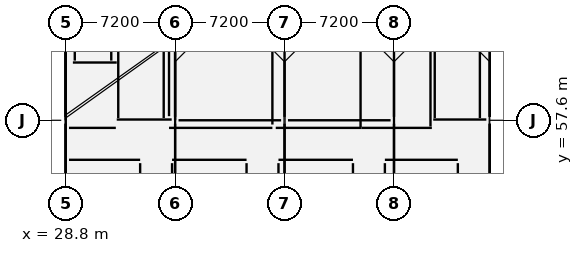
"""IFC4 building model, lengths in metres.
Left out: names, types, materials, properties, quantities, classifications, styles, units other than length and angle.
Written with IfcOpenShell. Run it as: python <this file> out.ifc"""

import sys

from ifc_helpers import new_model, si_unit, direction, frame, frame_2d, origin, origin_2d, place, context, subcontext, project, spatial, rectangle, hollow_rectangle, extrude, element, fill, save


model = new_model("IFC4")
c1 = context("Model", 3, precision=1e-05, world=origin(), true_north=direction((0.0, 1.0)))
c2 = subcontext(c1, "Body", "Model", "MODEL_VIEW")
j1 = project(units=[si_unit("LENGTHUNIT", "METRE"), si_unit("PLANEANGLEUNIT", "RADIAN")], contexts=[c1])
p1 = place(None, origin())
s1 = spatial("IfcSite", under=j1, at=p1, CompositionType="ELEMENT")
p2 = place(p1, origin())
s2 = spatial("IfcBuilding", under=s1, at=p2, CompositionType="ELEMENT")
p3 = place(p2, frame((0.0, 0.0, 9.6)))
s3 = spatial("IfcBuildingStorey", under=s2, at=p3, CompositionType="ELEMENT", Elevation=9.6)
for number, where, z_axis, x_axis in (
    (1, (28.8, 57.6, 0.0), (0.0, 0.0, 1.0), (1.0, 0.0, 0.0)),
    (2, (36.0, 57.6, 0.0), (0.0, 0.0, 1.0), (1.0, 0.0, 0.0)),
    (3, (43.2, 57.6, 0.0), (0.0, 0.0, 1.0), (1.0, 0.0, 0.0)),
    (4, (50.4, 57.6, 0.0), (0.0, 0.0, 1.0), (1.0, 0.0, 0.0)),
    (5, (56.7, 57.6, 0.0), (0.0, 0.0, 1.0), (1.0, 0.0, 0.0)),
):
    element("IfcColumn", number, at=place(p3, frame(where, z_axis=z_axis, x_axis=x_axis)), inside=s3, PredefinedType="COLUMN", context=c2, shape_type="SweptSolid", body=[
        extrude(rectangle(XDim=0.45, YDim=0.45, at=origin_2d()), origin(), (0.0, 0.0, 1.0), 3.9),
    ])
p4 = place(p3, frame((29.275, 61.4, 0.0), z_axis=(0.0, 0.0, 1.0), x_axis=(1.0, 0.0, 0.0)))
e6 = element("IfcWall", 6, at=p4, inside=s3, PredefinedType="SHEAR", context=c2, shape_type="SweptSolid", body=[
    extrude(rectangle(XDim=2.885, YDim=0.25, at=frame_2d((1.442, 0.0))), origin(), (0.0, 0.0, 1.0), 3.65),
])
p5 = place(p4, frame((0.942, 0.0, 0.0)))
e7 = element("IfcOpeningElement", 7, at=p5, cuts=e6, PredefinedType="OPENING", context=c2, shape_type="SweptSolid", body=[
    extrude(rectangle(XDim=1.0, YDim=2.1, at=frame_2d((0.5, 1.05))), frame((0.0, 0.137, 0.0), z_axis=(0.0, -1.0, 0.0), x_axis=(1.0, 0.0, 0.0)), (0.0, 0.0, 1.0), 0.274),
])
for number, where, z_axis, x_axis in (
    (8, (29.4, 61.525, 0.0), (0.0, 0.0, 1.0), (0.0, 1.0, 0.0)),
    (9, (31.8, 61.525, 0.0), (0.0, 0.0, 1.0), (0.0, 1.0, 0.0)),
):
    element("IfcWall", number, at=place(p3, frame(where, z_axis=z_axis, x_axis=x_axis)), inside=s3, PredefinedType="SHEAR", context=c2, shape_type="SweptSolid", body=[
        extrude(rectangle(XDim=2.15, YDim=0.25, at=frame_2d((1.075, 0.0))), origin(), (0.0, 0.0, 1.0), 3.65),
    ])
p6 = place(p3, frame((32.16, 57.65, 0.0), z_axis=(0.0, 0.0, 1.0), x_axis=(1.0, 0.0, 0.0)))
e10 = element("IfcWall", 10, at=p6, inside=s3, PredefinedType="SHEAR", context=c2, shape_type="SweptSolid", body=[
    extrude(rectangle(XDim=3.615, YDim=0.2, at=frame_2d((1.808, 0.0))), origin(), (0.0, 0.0, 1.0), 3.65),
])
p7 = place(p6, frame((1.258, 0.0, 0.0)))
e11 = element("IfcOpeningElement", 11, at=p7, cuts=e10, PredefinedType="OPENING", context=c2, shape_type="SweptSolid", body=[
    extrude(rectangle(XDim=1.1, YDim=2.15, at=frame_2d((0.55, 1.075))), frame((0.0, 0.112, 0.0), z_axis=(0.0, -1.0, 0.0), x_axis=(1.0, 0.0, 0.0)), (0.0, 0.0, 1.0), 0.224),
])
for number, where, z_axis, x_axis in (
    (12, (32.26, 57.75, 0.0), (0.0, 0.0, 1.0), (0.0, 1.0, 0.0)),
    (13, (35.25, 57.75, 0.0), (0.0, 0.0, 1.0), (0.0, 1.0, 0.0)),
):
    element("IfcWall", number, at=place(p3, frame(where, z_axis=z_axis, x_axis=x_axis)), inside=s3, PredefinedType="SHEAR", context=c2, shape_type="SweptSolid", body=[
        extrude(rectangle(XDim=6.56, YDim=0.2, at=frame_2d((3.28, 0.0))), origin(), (0.0, 0.0, 1.0), 3.65),
    ])
p8 = place(p3, frame((52.98, 57.65, 0.0), z_axis=(0.0, 0.0, 1.0), x_axis=(1.0, 0.0, 0.0)))
e14 = element("IfcWall", 14, at=p8, inside=s3, PredefinedType="SHEAR", context=c2, shape_type="SweptSolid", body=[
    extrude(rectangle(XDim=3.495, YDim=0.2, at=frame_2d((1.748, 0.0))), origin(), (0.0, 0.0, 1.0), 3.65),
])
p9 = place(p8, frame((1.198, 0.0, 0.0)))
e15 = element("IfcOpeningElement", 15, at=p9, cuts=e14, PredefinedType="OPENING", context=c2, shape_type="SweptSolid", body=[
    extrude(rectangle(XDim=1.1, YDim=2.15, at=frame_2d((0.55, 1.075))), frame((0.0, 0.112, 0.0), z_axis=(0.0, -1.0, 0.0), x_axis=(1.0, 0.0, 0.0)), (0.0, 0.0, 1.0), 0.224),
])
for number, where, z_axis, x_axis in (
    (16, (53.08, 57.75, 0.0), (0.0, 0.0, 1.0), (0.0, 1.0, 0.0)),
    (17, (56.05, 57.75, 0.0), (0.0, 0.0, 1.0), (0.0, 1.0, 0.0)),
):
    element("IfcWall", number, at=place(p3, frame(where, z_axis=z_axis, x_axis=x_axis)), inside=s3, PredefinedType="SHEAR", context=c2, shape_type="SweptSolid", body=[
        extrude(rectangle(XDim=6.54, YDim=0.2, at=frame_2d((3.27, 0.0))), origin(), (0.0, 0.0, 1.0), 3.65),
    ])
p10 = place(p3, frame((28.8, 57.6, 3.9), z_axis=(0.0, 0.0, 1.0), x_axis=(1.0, 0.0, 0.0)))
e18 = element("IfcColumn", 18, at=p10, inside=s3, PredefinedType="COLUMN", context=c2, shape_type="SweptSolid", body=[
    extrude(hollow_rectangle(XDim=0.25, YDim=0.25, WallThickness=0.012, InnerFilletRadius=0.012, OuterFilletRadius=0.024, at=origin_2d()), origin(), (0.0, 0.0, 1.0), 2.29),
])
p11 = place(p3, frame((36.0, 57.6, 3.9), z_axis=(0.0, 0.0, 1.0), x_axis=(1.0, 0.0, 0.0)))
e19 = element("IfcColumn", 19, at=p11, inside=s3, PredefinedType="COLUMN", context=c2, shape_type="SweptSolid", body=[
    extrude(hollow_rectangle(XDim=0.25, YDim=0.25, WallThickness=0.012, InnerFilletRadius=0.012, OuterFilletRadius=0.024, at=origin_2d()), origin(), (0.0, 0.0, 1.0), 4.18),
])
for number, where, z_axis, x_axis in (
    (20, (56.7, 50.625, 0.0), (0.0, 0.0, 1.0), (0.0, 1.0, 0.0)),
    (21, (56.7, 57.825, 0.0), (0.0, 0.0, 1.0), (0.0, 1.0, 0.0)),
    (22, (28.8, 64.575, 0.0), (0.0, 0.0, 1.0), (0.0, -1.0, 0.0)),
):
    element("IfcWall", number, at=place(p3, frame(where, z_axis=z_axis, x_axis=x_axis)), inside=s3, PredefinedType="ELEMENTEDWALL", context=c2, shape_type="SweptSolid", body=[
        extrude(rectangle(XDim=6.75, YDim=0.28, at=frame_2d((3.375, 0.0))), origin(), (0.0, 0.0, 1.0), 3.473),
    ])
p12 = place(p3, frame((28.8, 57.375, 0.0), z_axis=(0.0, 0.0, 1.0), x_axis=(0.0, -1.0, 0.0)))
e23 = element("IfcWall", 23, at=p12, inside=s3, PredefinedType="ELEMENTEDWALL", context=c2, shape_type="SweptSolid", body=[
    extrude(rectangle(XDim=6.75, YDim=0.28, at=frame_2d((3.375, 0.0))), origin(), (0.0, 0.0, 1.0), 3.473),
])
p13 = place(p12, frame((3.913, 0.0, 0.85)))
e24 = element("IfcOpeningElement", 24, at=p13, cuts=e23, PredefinedType="OPENING", context=c2, shape_type="SweptSolid", body=[
    extrude(rectangle(XDim=1.4, YDim=1.65, at=frame_2d((0.7, 0.825))), frame((0.0, 0.152, 0.0), z_axis=(0.0, -1.0, 0.0), x_axis=(1.0, 0.0, 0.0)), (0.0, 0.0, 1.0), 0.304),
])
p14 = place(p3, frame((28.8, 50.75, 3.95), z_axis=(0.0, 0.0, 1.0), x_axis=(0.0, 1.0, 0.0)))
e25 = element("IfcWall", 25, at=p14, inside=s3, PredefinedType="ELEMENTEDWALL", context=c2, shape_type="SweptSolid", body=[
    extrude(rectangle(XDim=13.7, YDim=0.28, at=frame_2d((6.85, 0.0))), origin(), (0.0, 0.0, 1.0), 2.23),
])
p15 = place(p3, frame((29.02, 57.1, 0.0), z_axis=(0.0, 0.0, 1.0), x_axis=(1.0, 0.0, 0.0)))
e26 = element("IfcWall", 26, at=p15, inside=s3, PredefinedType="STANDARD", context=c2, shape_type="SweptSolid", body=[
    extrude(rectangle(XDim=3.08, YDim=0.22, at=frame_2d((1.54, 0.0))), origin(), (0.0, 0.0, 1.0), 3.62),
])
p16 = place(p15, frame((0.94, 0.0, 0.0)))
e27 = element("IfcOpeningElement", 27, at=p16, cuts=e26, PredefinedType="OPENING", context=c2, shape_type="SweptSolid", body=[
    extrude(rectangle(XDim=1.2, YDim=2.2, at=frame_2d((0.6, 1.1))), frame((0.0, 0.122, 0.0), z_axis=(0.0, -1.0, 0.0), x_axis=(1.0, 0.0, 0.0)), (0.0, 0.0, 1.0), 0.244),
])
p17 = place(p3, frame((29.02, 55.0, 0.0), z_axis=(0.0, 0.0, 1.0), x_axis=(1.0, 0.0, 0.0)))
e28 = element("IfcWall", 28, at=p17, inside=s3, PredefinedType="PARTITIONING", context=c2, shape_type="SweptSolid", body=[
    extrude(rectangle(XDim=4.68, YDim=0.14, at=frame_2d((2.34, 0.0))), origin(), (0.0, 0.0, 1.0), 3.62),
])
p18 = place(p17, frame((1.865, 0.0, 0.0)))
e29 = element("IfcOpeningElement", 29, at=p18, cuts=e28, PredefinedType="OPENING", context=c2, shape_type="SweptSolid", body=[
    extrude(rectangle(XDim=0.95, YDim=2.1, at=frame_2d((0.475, 1.05))), frame((0.0, 0.082, 0.0), z_axis=(0.0, -1.0, 0.0), x_axis=(1.0, 0.0, 0.0)), (0.0, 0.0, 1.0), 0.164),
])
p19 = place(p3, frame((33.7, 50.62, 0.0), z_axis=(0.0, 0.0, 1.0), x_axis=(0.0, 1.0, 0.0)))
e30 = element("IfcWall", 30, at=p19, inside=s3, PredefinedType="PARTITIONING", context=c2, shape_type="SweptSolid", body=[
    extrude(rectangle(XDim=4.16, YDim=0.14, at=frame_2d((2.08, 0.0))), origin(), (0.0, 0.0, 1.0), 3.62),
])
p20 = place(p19, frame((1.64, 0.0, 0.0)))
e31 = element("IfcOpeningElement", 31, at=p20, cuts=e30, PredefinedType="OPENING", context=c2, shape_type="SweptSolid", body=[
    extrude(rectangle(XDim=0.88, YDim=2.08, at=frame_2d((0.44, 1.04))), frame((0.0, 0.082, 0.0), z_axis=(0.0, -1.0, 0.0), x_axis=(1.0, 0.0, 0.0)), (0.0, 0.0, 1.0), 0.164),
])
p21 = place(p3, frame((35.8, 55.0, 0.0), z_axis=(0.0, 0.0, 1.0), x_axis=(1.0, 0.0, 0.0)))
e32 = element("IfcWall", 32, at=p21, inside=s3, PredefinedType="PARTITIONING", context=c2, shape_type="SweptSolid", body=[
    extrude(rectangle(XDim=4.9, YDim=0.14, at=frame_2d((2.45, 0.0))), origin(), (0.0, 0.0, 1.0), 3.471),
])
p22 = place(p21, frame((1.975, 0.0, 0.0)))
e33 = element("IfcOpeningElement", 33, at=p22, cuts=e32, PredefinedType="OPENING", context=c2, shape_type="SweptSolid", body=[
    extrude(rectangle(XDim=0.95, YDim=2.1, at=frame_2d((0.475, 1.05))), frame((0.0, 0.082, 0.0), z_axis=(0.0, -1.0, 0.0), x_axis=(1.0, 0.0, 0.0)), (0.0, 0.0, 1.0), 0.164),
])
p23 = place(p3, frame((40.7, 50.62, 0.0), z_axis=(0.0, 0.0, 1.0), x_axis=(0.0, 1.0, 0.0)))
e34 = element("IfcWall", 34, at=p23, inside=s3, PredefinedType="PARTITIONING", context=c2, shape_type="SweptSolid", body=[
    extrude(rectangle(XDim=4.16, YDim=0.14, at=frame_2d((2.08, 0.0))), origin(), (0.0, 0.0, 1.0), 3.62),
])
p24 = place(p23, frame((1.64, 0.0, 0.0)))
e35 = element("IfcOpeningElement", 35, at=p24, cuts=e34, PredefinedType="OPENING", context=c2, shape_type="SweptSolid", body=[
    extrude(rectangle(XDim=0.88, YDim=2.08, at=frame_2d((0.44, 1.04))), frame((0.0, 0.082, 0.0), z_axis=(0.0, -1.0, 0.0), x_axis=(1.0, 0.0, 0.0)), (0.0, 0.0, 1.0), 0.164),
])
p25 = place(p3, frame((35.8, 53.82, 0.0), z_axis=(0.0, 0.0, 1.0), x_axis=(0.0, 1.0, 0.0)))
e36 = element("IfcWall", 36, at=p25, inside=s3, PredefinedType="PARTITIONING", context=c2, shape_type="SweptSolid", body=[
    extrude(rectangle(XDim=0.96, YDim=0.14, at=frame_2d((0.48, 0.0))), origin(), (0.0, 0.0, 1.0), 3.471),
])
p26 = place(p3, frame((42.8, 55.0, 0.0), z_axis=(0.0, 0.0, 1.0), x_axis=(1.0, 0.0, 0.0)))
e37 = element("IfcWall", 37, at=p26, inside=s3, PredefinedType="PARTITIONING", context=c2, shape_type="SweptSolid", body=[
    extrude(rectangle(XDim=4.9, YDim=0.14, at=frame_2d((2.45, 0.0))), origin(), (0.0, 0.0, 1.0), 3.471),
])
p27 = place(p26, frame((1.975, 0.0, 0.0)))
e38 = element("IfcOpeningElement", 38, at=p27, cuts=e37, PredefinedType="OPENING", context=c2, shape_type="SweptSolid", body=[
    extrude(rectangle(XDim=0.95, YDim=2.1, at=frame_2d((0.475, 1.05))), frame((0.0, 0.082, 0.0), z_axis=(0.0, -1.0, 0.0), x_axis=(1.0, 0.0, 0.0)), (0.0, 0.0, 1.0), 0.164),
])
p28 = place(p3, frame((47.7, 50.62, 0.0), z_axis=(0.0, 0.0, 1.0), x_axis=(0.0, 1.0, 0.0)))
e39 = element("IfcWall", 39, at=p28, inside=s3, PredefinedType="PARTITIONING", context=c2, shape_type="SweptSolid", body=[
    extrude(rectangle(XDim=4.16, YDim=0.14, at=frame_2d((2.08, 0.0))), origin(), (0.0, 0.0, 1.0), 3.62),
])
p29 = place(p28, frame((1.64, 0.0, 0.0)))
e40 = element("IfcOpeningElement", 40, at=p29, cuts=e39, PredefinedType="OPENING", context=c2, shape_type="SweptSolid", body=[
    extrude(rectangle(XDim=0.88, YDim=2.08, at=frame_2d((0.44, 1.04))), frame((0.0, 0.082, 0.0), z_axis=(0.0, -1.0, 0.0), x_axis=(1.0, 0.0, 0.0)), (0.0, 0.0, 1.0), 0.164),
])
p30 = place(p3, frame((42.8, 53.82, 0.0), z_axis=(0.0, 0.0, 1.0), x_axis=(0.0, 1.0, 0.0)))
e41 = element("IfcWall", 41, at=p30, inside=s3, PredefinedType="PARTITIONING", context=c2, shape_type="SweptSolid", body=[
    extrude(rectangle(XDim=0.96, YDim=0.14, at=frame_2d((0.48, 0.0))), origin(), (0.0, 0.0, 1.0), 3.62),
])
p31 = place(p3, frame((49.8, 55.0, 0.0), z_axis=(0.0, 0.0, 1.0), x_axis=(1.0, 0.0, 0.0)))
e42 = element("IfcWall", 42, at=p31, inside=s3, PredefinedType="PARTITIONING", context=c2, shape_type="SweptSolid", body=[
    extrude(rectangle(XDim=4.8, YDim=0.14, at=frame_2d((2.4, 0.0))), origin(), (0.0, 0.0, 1.0), 3.471),
])
p32 = place(p31, frame((1.925, 0.0, 0.0)))
e43 = element("IfcOpeningElement", 43, at=p32, cuts=e42, PredefinedType="OPENING", context=c2, shape_type="SweptSolid", body=[
    extrude(rectangle(XDim=0.95, YDim=2.1, at=frame_2d((0.475, 1.05))), frame((0.0, 0.082, 0.0), z_axis=(0.0, -1.0, 0.0), x_axis=(1.0, 0.0, 0.0)), (0.0, 0.0, 1.0), 0.164),
])
p33 = place(p3, frame((54.6, 50.62, 0.0), z_axis=(0.0, 0.0, 1.0), x_axis=(0.0, 1.0, 0.0)))
e44 = element("IfcWall", 44, at=p33, inside=s3, PredefinedType="PARTITIONING", context=c2, shape_type="SweptSolid", body=[
    extrude(rectangle(XDim=4.16, YDim=0.14, at=frame_2d((2.08, 0.0))), origin(), (0.0, 0.0, 1.0), 3.62),
])
p34 = place(p33, frame((1.64, 0.0, 0.0)))
e45 = element("IfcOpeningElement", 45, at=p34, cuts=e44, PredefinedType="OPENING", context=c2, shape_type="SweptSolid", body=[
    extrude(rectangle(XDim=0.88, YDim=2.08, at=frame_2d((0.44, 1.04))), frame((0.0, 0.082, 0.0), z_axis=(0.0, -1.0, 0.0), x_axis=(1.0, 0.0, 0.0)), (0.0, 0.0, 1.0), 0.164),
])
p35 = place(p3, frame((49.8, 53.82, 0.0), z_axis=(0.0, 0.0, 1.0), x_axis=(0.0, 1.0, 0.0)))
e46 = element("IfcWall", 46, at=p35, inside=s3, PredefinedType="PARTITIONING", context=c2, shape_type="SweptSolid", body=[
    extrude(rectangle(XDim=0.96, YDim=0.14, at=frame_2d((0.48, 0.0))), origin(), (0.0, 0.0, 1.0), 3.62),
])
p36 = place(p3, frame((35.6, 57.1, 0.0), z_axis=(0.0, 0.0, 1.0), x_axis=(1.0, 0.0, 0.0)))
e47 = element("IfcWall", 47, at=p36, inside=s3, PredefinedType="PARTITIONING", context=c2, shape_type="SweptSolid", body=[
    extrude(rectangle(XDim=6.8, YDim=0.14, at=frame_2d((3.4, 0.0))), origin(), (0.0, 0.0, 1.0), 3.471),
])
p37 = place(p36, frame((2.925, 0.0, 0.0)))
e48 = element("IfcOpeningElement", 48, at=p37, cuts=e47, PredefinedType="OPENING", context=c2, shape_type="SweptSolid", body=[
    extrude(rectangle(XDim=0.95, YDim=2.1, at=frame_2d((0.475, 1.05))), frame((0.0, 0.082, 0.0), z_axis=(0.0, -1.0, 0.0), x_axis=(1.0, 0.0, 0.0)), (0.0, 0.0, 1.0), 0.164),
])
p38 = place(p3, frame((42.4, 57.32, 0.0), z_axis=(0.0, 0.0, 1.0), x_axis=(0.0, 1.0, 0.0)))
e49 = element("IfcWall", 49, at=p38, inside=s3, PredefinedType="PARTITIONING", context=c2, shape_type="SweptSolid", body=[
    extrude(rectangle(XDim=7.26, YDim=0.14, at=frame_2d((3.63, 0.0))), origin(), (0.0, 0.0, 1.0), 3.473),
])
p39 = place(p3, frame((35.6, 57.87, 0.0), z_axis=(0.0, 0.0, 1.0), x_axis=(0.0, 1.0, 0.0)))
e50 = element("IfcWall", 50, at=p39, inside=s3, PredefinedType="PARTITIONING", context=c2, shape_type="SweptSolid", body=[
    extrude(rectangle(XDim=6.71, YDim=0.14, at=frame_2d((3.355, 0.0))), origin(), (0.0, 0.0, 1.0), 3.62),
])
p40 = place(p3, frame((42.62, 57.1, 0.0), z_axis=(0.0, 0.0, 1.0), x_axis=(1.0, 0.0, 0.0)))
e51 = element("IfcWall", 51, at=p40, inside=s3, PredefinedType="PARTITIONING", context=c2, shape_type="SweptSolid", body=[
    extrude(rectangle(XDim=5.63, YDim=0.1, at=frame_2d((2.815, 0.0))), origin(), (0.0, 0.0, 1.0), 3.471),
])
p41 = place(p40, frame((2.315, 0.0, 0.0)))
e52 = element("IfcOpeningElement", 52, at=p41, cuts=e51, PredefinedType="OPENING", context=c2, shape_type="SweptSolid", body=[
    extrude(rectangle(XDim=1.0, YDim=2.15, at=frame_2d((0.5, 1.075))), frame((0.0, 0.062, 0.0), z_axis=(0.0, -1.0, 0.0), x_axis=(1.0, 0.0, 0.0)), (0.0, 0.0, 1.0), 0.124),
])
p42 = place(p3, frame((48.2, 57.152, 0.0), z_axis=(0.0, 0.0, 1.0), x_axis=(0.0, 1.0, 0.0)))
e53 = element("IfcWall", 53, at=p42, inside=s3, PredefinedType="PARTITIONING", context=c2, shape_type="SweptSolid", body=[
    extrude(rectangle(XDim=7.506, YDim=0.1, at=frame_2d((3.753, 0.0))), origin(), (0.0, 0.0, 1.0), 3.473),
])
p43 = place(p3, frame((48.252, 57.1, 0.0), z_axis=(0.0, 0.0, 1.0), x_axis=(1.0, 0.0, 0.0)))
e54 = element("IfcWall", 54, at=p43, inside=s3, PredefinedType="PLUMBINGWALL", context=c2, shape_type="SweptSolid", body=[
    extrude(rectangle(XDim=4.638, YDim=0.18, at=frame_2d((2.319, 0.0))), origin(), (0.0, 0.0, 1.0), 3.471),
])
p44 = place(p43, frame((2.619, 0.0, 0.0)))
e55 = element("IfcOpeningElement", 55, at=p44, cuts=e54, PredefinedType="OPENING", context=c2, shape_type="SweptSolid", body=[
    extrude(rectangle(XDim=0.9, YDim=2.1, at=frame_2d((0.45, 1.05))), frame((0.0, 0.102, 0.0), z_axis=(0.0, -1.0, 0.0), x_axis=(1.0, 0.0, 0.0)), (0.0, 0.0, 1.0), 0.204),
])
p45 = place(p3, frame((52.8, 57.192, 0.0), z_axis=(0.0, 0.0, 1.0), x_axis=(0.0, 1.0, 0.0)))
e56 = element("IfcWall", 56, at=p45, inside=s3, PredefinedType="PLUMBINGWALL", context=c2, shape_type="SweptSolid", body=[
    extrude(rectangle(XDim=7.466, YDim=0.18, at=frame_2d((3.733, 0.0))), origin(), (0.0, 0.0, 1.0), 3.473),
])
p46 = place(p7, origin())
e57 = element("IfcDoor", 57, at=p46, inside=s3, OperationType="SINGLE_SWING_LEFT", PredefinedType="DOOR", context=c2, shape_type="SweptSolid", body=[
    extrude(rectangle(XDim=1.1, YDim=2.15, at=frame_2d((0.55, 1.075))), frame((0.0, 0.025, 0.0), z_axis=(0.0, -1.0, 0.0), x_axis=(1.0, 0.0, 0.0)), (0.0, 0.0, 1.0), 0.05),
])
fill(e11, e57)
p47 = place(p9, origin())
e58 = element("IfcDoor", 58, at=p47, inside=s3, OperationType="SINGLE_SWING_RIGHT", PredefinedType="DOOR", context=c2, shape_type="SweptSolid", body=[
    extrude(rectangle(XDim=1.1, YDim=2.15, at=frame_2d((0.55, 1.075))), frame((0.0, 0.025, 0.0), z_axis=(0.0, -1.0, 0.0), x_axis=(1.0, 0.0, 0.0)), (0.0, 0.0, 1.0), 0.05),
])
fill(e15, e58)
p48 = place(p5, origin())
e59 = element("IfcDoor", 59, at=p48, inside=s3, OperationType="SLIDING_TO_RIGHT", PredefinedType="DOOR", context=c2, shape_type="SweptSolid", body=[
    extrude(rectangle(XDim=1.0, YDim=2.1, at=frame_2d((0.5, 1.05))), frame((0.0, 0.025, 0.0), z_axis=(0.0, -1.0, 0.0), x_axis=(1.0, 0.0, 0.0)), (0.0, 0.0, 1.0), 0.05),
])
fill(e7, e59)
p49 = place(p16, origin())
e60 = element("IfcDoor", 60, at=p49, inside=s3, OperationType="SINGLE_SWING_LEFT", PredefinedType="DOOR", context=c2, shape_type="SweptSolid", body=[
    extrude(rectangle(XDim=1.2, YDim=2.2, at=frame_2d((0.6, 1.1))), frame((0.0, 0.025, 0.0), z_axis=(0.0, -1.0, 0.0), x_axis=(1.0, 0.0, 0.0)), (0.0, 0.0, 1.0), 0.05),
])
fill(e27, e60)
p50 = place(p18, origin())
e61 = element("IfcDoor", 61, at=p50, inside=s3, OperationType="SINGLE_SWING_RIGHT", PredefinedType="DOOR", context=c2, shape_type="SweptSolid", body=[
    extrude(rectangle(XDim=0.95, YDim=2.1, at=frame_2d((0.475, 1.05))), frame((0.0, 0.025, 0.0), z_axis=(0.0, -1.0, 0.0), x_axis=(1.0, 0.0, 0.0)), (0.0, 0.0, 1.0), 0.05),
])
fill(e29, e61)
p51 = place(p22, origin())
e62 = element("IfcDoor", 62, at=p51, inside=s3, OperationType="SINGLE_SWING_RIGHT", PredefinedType="DOOR", context=c2, shape_type="SweptSolid", body=[
    extrude(rectangle(XDim=0.95, YDim=2.1, at=frame_2d((0.475, 1.05))), frame((0.0, 0.025, 0.0), z_axis=(0.0, -1.0, 0.0), x_axis=(1.0, 0.0, 0.0)), (0.0, 0.0, 1.0), 0.05),
])
fill(e33, e62)
p52 = place(p27, origin())
e63 = element("IfcDoor", 63, at=p52, inside=s3, OperationType="SINGLE_SWING_RIGHT", PredefinedType="DOOR", context=c2, shape_type="SweptSolid", body=[
    extrude(rectangle(XDim=0.95, YDim=2.1, at=frame_2d((0.475, 1.05))), frame((0.0, 0.025, 0.0), z_axis=(0.0, -1.0, 0.0), x_axis=(1.0, 0.0, 0.0)), (0.0, 0.0, 1.0), 0.05),
])
fill(e38, e63)
p53 = place(p32, origin())
e64 = element("IfcDoor", 64, at=p53, inside=s3, OperationType="SINGLE_SWING_RIGHT", PredefinedType="DOOR", context=c2, shape_type="SweptSolid", body=[
    extrude(rectangle(XDim=0.95, YDim=2.1, at=frame_2d((0.475, 1.05))), frame((0.0, 0.025, 0.0), z_axis=(0.0, -1.0, 0.0), x_axis=(1.0, 0.0, 0.0)), (0.0, 0.0, 1.0), 0.05),
])
fill(e43, e64)
p54 = place(p37, origin())
e65 = element("IfcDoor", 65, at=p54, inside=s3, OperationType="SINGLE_SWING_RIGHT", PredefinedType="DOOR", context=c2, shape_type="SweptSolid", body=[
    extrude(rectangle(XDim=0.95, YDim=2.1, at=frame_2d((0.475, 1.05))), frame((0.0, 0.025, 0.0), z_axis=(0.0, -1.0, 0.0), x_axis=(1.0, 0.0, 0.0)), (0.0, 0.0, 1.0), 0.05),
])
fill(e48, e65)
p55 = place(p41, origin())
e66 = element("IfcDoor", 66, at=p55, inside=s3, OperationType="SINGLE_SWING_LEFT", PredefinedType="DOOR", context=c2, shape_type="SweptSolid", body=[
    extrude(rectangle(XDim=1.0, YDim=2.15, at=frame_2d((0.5, 1.075))), frame((0.0, 0.025, 0.0), z_axis=(0.0, -1.0, 0.0), x_axis=(1.0, 0.0, 0.0)), (0.0, 0.0, 1.0), 0.05),
])
fill(e52, e66)
p56 = place(p44, origin())
e67 = element("IfcDoor", 67, at=p56, inside=s3, OperationType="SINGLE_SWING_RIGHT", PredefinedType="DOOR", context=c2, shape_type="SweptSolid", body=[
    extrude(rectangle(XDim=0.9, YDim=2.1, at=frame_2d((0.45, 1.05))), frame((0.0, 0.025, 0.0), z_axis=(0.0, -1.0, 0.0), x_axis=(1.0, 0.0, 0.0)), (0.0, 0.0, 1.0), 0.05),
])
fill(e55, e67)
save(model, sys.argv[1])
